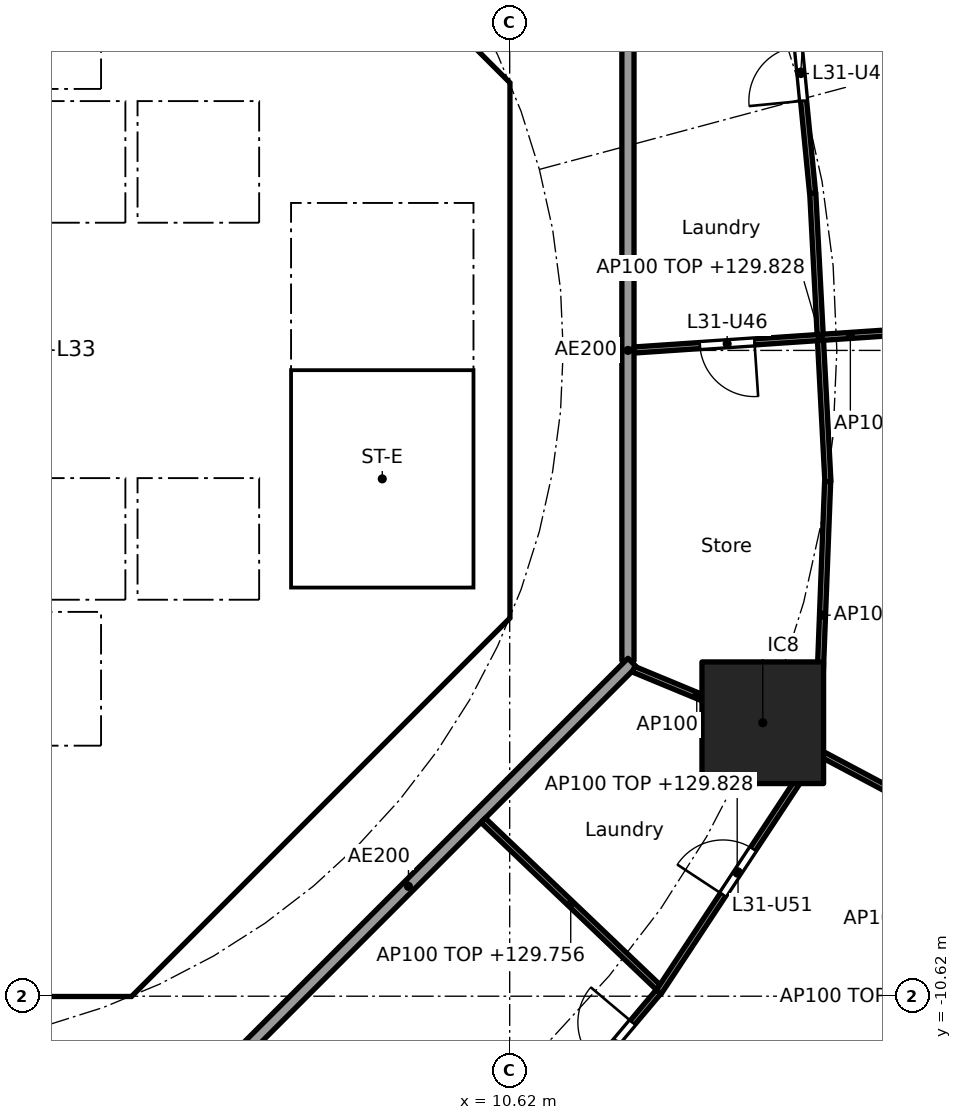
"""IFC4 building model, lengths in metres.
Left out: names, types, materials, properties, quantities, classifications, styles, units other than length and angle.
Written with IfcOpenShell. Run it as: python <this file> out.ifc"""

import sys

from ifc_helpers import new_model, si_unit, direction, frame, frame_2d, origin, origin_2d, place, context, subcontext, project, spatial, polyline, rectangle, outline, extrude, element, fill, save


model = new_model("IFC4")
c1 = context("Model", 3, precision=1e-05, world=origin(), true_north=direction((0.0, 1.0)))
c2 = subcontext(c1, "Body", "Model", "MODEL_VIEW")
j1 = project(units=[si_unit("LENGTHUNIT", "METRE"), si_unit("PLANEANGLEUNIT", "RADIAN")], contexts=[c1])
p1 = place(None, origin())
s1 = spatial("IfcSite", under=j1, at=p1, CompositionType="ELEMENT")
p2 = place(p1, origin())
s2 = spatial("IfcBuilding", under=s1, at=p2, CompositionType="ELEMENT")
p3 = place(p2, frame((0.0, 0.0, 127.0)))
s3 = spatial("IfcBuildingStorey", under=s2, at=p3, CompositionType="ELEMENT", Elevation=127.0)
p4 = place(p3, frame((14.782, -6.123, 0.0), z_axis=(0.0, 0.0, 1.0), x_axis=(1.0, 0.0, 0.0)))
e1 = element("IfcColumn", 1, at=p4, inside=s3, PredefinedType="COLUMN", context=c2, shape_type="SweptSolid", body=[
    extrude(rectangle(XDim=2.0, YDim=2.0, at=origin_2d()), origin(), (0.0, 0.0, 1.0), 3.7),
])
p5 = place(p3, frame((9.988, 4.613, 0.0), z_axis=(0.0, 0.0, 1.0), x_axis=(-0.707106781187, 0.707106781187, 0.0)))
e2 = element("IfcWall", 2, at=p5, inside=s3, PredefinedType="SHEAR", context=c2, shape_type="SweptSolid", body=[
    extrude(rectangle(XDim=7.602, YDim=0.6, at=frame_2d((3.801, 0.0))), origin(), (0.0, 0.0, 1.0), 3.44),
])
p6 = place(p5, frame((3.201, 0.0, 0.0)))
e3 = element("IfcOpeningElement", 3, at=p6, cuts=e2, PredefinedType="OPENING", context=c2, shape_type="SweptSolid", body=[
    extrude(rectangle(XDim=1.2, YDim=2.1, at=frame_2d((0.6, 1.05))), frame((0.0, 0.31, 0.0), z_axis=(0.0, -1.0, 0.0), x_axis=(1.0, 0.0, 0.0)), (0.0, 0.0, 1.0), 0.62),
])
p7 = place(p3, frame((4.613, -9.988, 0.0), z_axis=(0.0, 0.0, 1.0), x_axis=(0.707106781187, 0.707106781187, 0.0)))
e4 = element("IfcWall", 4, at=p7, inside=s3, PredefinedType="SHEAR", context=c2, shape_type="SweptSolid", body=[
    extrude(rectangle(XDim=7.602, YDim=0.6, at=frame_2d((3.801, 0.0))), origin(), (0.0, 0.0, 1.0), 3.44),
])
p8 = place(p7, frame((3.201, 0.0, 0.0)))
e5 = element("IfcOpeningElement", 5, at=p8, cuts=e4, PredefinedType="OPENING", context=c2, shape_type="SweptSolid", body=[
    extrude(rectangle(XDim=1.2, YDim=2.1, at=frame_2d((0.6, 1.05))), frame((0.0, 0.31, 0.0), z_axis=(0.0, -1.0, 0.0), x_axis=(1.0, 0.0, 0.0)), (0.0, 0.0, 1.0), 0.62),
])
p9 = place(p3, frame((4.0, 4.3, 0.0), z_axis=(0.0, 0.0, 1.0), x_axis=(0.0, 1.0, 0.0)))
e6 = element("IfcWall", 6, at=p9, inside=s3, PredefinedType="SOLIDWALL", context=c2, shape_type="SweptSolid", body=[
    extrude(rectangle(XDim=2.2, YDim=0.2, at=frame_2d((1.1, 0.0))), origin(), (0.0, 0.0, 1.0), 3.44),
])
p10 = place(p9, frame((0.55, 0.0, 0.0)))
e7 = element("IfcOpeningElement", 7, at=p10, cuts=e6, PredefinedType="OPENING", context=c2, shape_type="SweptSolid", body=[
    extrude(rectangle(XDim=1.1, YDim=2.1, at=frame_2d((0.55, 1.05))), frame((0.0, 0.11, 0.0), z_axis=(0.0, -1.0, 0.0), x_axis=(1.0, 0.0, 0.0)), (0.0, 0.0, 1.0), 0.22),
])
p11 = place(p3, frame((-6.7, 2.0, 0.0), z_axis=(0.0, 0.0, 1.0), x_axis=(1.0, 0.0, 0.0)))
e8 = element("IfcWall", 8, at=p11, inside=s3, PredefinedType="SOLIDWALL", context=c2, shape_type="SweptSolid", body=[
    extrude(rectangle(XDim=13.4, YDim=0.2, at=frame_2d((6.7, 0.0))), origin(), (0.0, 0.0, 1.0), 3.44),
])
p12 = place(p11, frame((0.65, 0.0, 0.0)))
e9 = element("IfcOpeningElement", 9, at=p12, cuts=e8, PredefinedType="OPENING", context=c2, shape_type="SweptSolid", body=[
    extrude(rectangle(XDim=1.1, YDim=2.1, at=frame_2d((0.55, 1.05))), frame((0.0, 0.11, 0.0), z_axis=(0.0, -1.0, 0.0), x_axis=(1.0, 0.0, 0.0)), (0.0, 0.0, 1.0), 0.22),
])
p13 = place(p11, frame((2.85, 0.0, 0.0)))
e10 = element("IfcOpeningElement", 10, at=p13, cuts=e8, PredefinedType="OPENING", context=c2, shape_type="SweptSolid", body=[
    extrude(rectangle(XDim=1.1, YDim=2.1, at=frame_2d((0.55, 1.05))), frame((0.0, 0.11, 0.0), z_axis=(0.0, -1.0, 0.0), x_axis=(1.0, 0.0, 0.0)), (0.0, 0.0, 1.0), 0.22),
])
p14 = place(p11, frame((5.05, 0.0, 0.0)))
e11 = element("IfcOpeningElement", 11, at=p14, cuts=e8, PredefinedType="OPENING", context=c2, shape_type="SweptSolid", body=[
    extrude(rectangle(XDim=1.1, YDim=2.1, at=frame_2d((0.55, 1.05))), frame((0.0, 0.11, 0.0), z_axis=(0.0, -1.0, 0.0), x_axis=(1.0, 0.0, 0.0)), (0.0, 0.0, 1.0), 0.22),
])
p15 = place(p3, frame((6.7, 4.0, 0.0), z_axis=(0.0, 0.0, 1.0), x_axis=(1.0, 0.0, 0.0)))
e12 = element("IfcWall", 12, at=p15, inside=s3, PredefinedType="SOLIDWALL", context=c2, shape_type="SweptSolid", body=[
    extrude(rectangle(XDim=3.325, YDim=0.2, at=frame_2d((1.662, 0.0))), origin(), (0.0, 0.0, 1.0), 3.44),
])
p16 = place(p15, frame((1.25, 0.0, 0.0)))
e13 = element("IfcOpeningElement", 13, at=p16, cuts=e12, PredefinedType="OPENING", context=c2, shape_type="SweptSolid", body=[
    extrude(rectangle(XDim=1.1, YDim=2.1, at=frame_2d((0.55, 1.05))), frame((0.0, 0.11, 0.0), z_axis=(0.0, -1.0, 0.0), x_axis=(1.0, 0.0, 0.0)), (0.0, 0.0, 1.0), 0.22),
])
p17 = place(p3, frame((4.0, -10.025, 0.0), z_axis=(0.0, 0.0, 1.0), x_axis=(0.0, 1.0, 0.0)))
e14 = element("IfcWall", 14, at=p17, inside=s3, PredefinedType="SOLIDWALL", context=c2, shape_type="SweptSolid", body=[
    extrude(rectangle(XDim=3.0, YDim=0.2, at=frame_2d((1.5, 0.0))), origin(), (0.0, 0.0, 1.0), 3.44),
])
p18 = place(p17, frame((0.975, 0.0, 0.0)))
e15 = element("IfcOpeningElement", 15, at=p18, cuts=e14, PredefinedType="OPENING", context=c2, shape_type="SweptSolid", body=[
    extrude(rectangle(XDim=1.1, YDim=2.1, at=frame_2d((0.55, 1.05))), frame((0.0, 0.11, 0.0), z_axis=(0.0, -1.0, 0.0), x_axis=(1.0, 0.0, 0.0)), (0.0, 0.0, 1.0), 0.22),
])
p19 = place(p3, frame((4.0, -6.5, 0.0), z_axis=(0.0, 0.0, 1.0), x_axis=(0.0, 1.0, 0.0)))
e16 = element("IfcWall", 16, at=p19, inside=s3, PredefinedType="SOLIDWALL", context=c2, shape_type="SweptSolid", body=[
    extrude(rectangle(XDim=2.2, YDim=0.2, at=frame_2d((1.1, 0.0))), origin(), (0.0, 0.0, 1.0), 3.44),
])
p20 = place(p19, frame((0.55, 0.0, 0.0)))
e17 = element("IfcOpeningElement", 17, at=p20, cuts=e16, PredefinedType="OPENING", context=c2, shape_type="SweptSolid", body=[
    extrude(rectangle(XDim=1.1, YDim=2.1, at=frame_2d((0.55, 1.05))), frame((0.0, 0.11, 0.0), z_axis=(0.0, -1.0, 0.0), x_axis=(1.0, 0.0, 0.0)), (0.0, 0.0, 1.0), 0.22),
])
p21 = place(p3, frame((-6.7, -2.0, 0.0), z_axis=(0.0, 0.0, 1.0), x_axis=(1.0, 0.0, 0.0)))
e18 = element("IfcWall", 18, at=p21, inside=s3, PredefinedType="SOLIDWALL", context=c2, shape_type="SweptSolid", body=[
    extrude(rectangle(XDim=13.4, YDim=0.2, at=frame_2d((6.7, 0.0))), origin(), (0.0, 0.0, 1.0), 3.44),
])
p22 = place(p21, frame((0.65, 0.0, 0.0)))
e19 = element("IfcOpeningElement", 19, at=p22, cuts=e18, PredefinedType="OPENING", context=c2, shape_type="SweptSolid", body=[
    extrude(rectangle(XDim=1.1, YDim=2.1, at=frame_2d((0.55, 1.05))), frame((0.0, 0.11, 0.0), z_axis=(0.0, -1.0, 0.0), x_axis=(1.0, 0.0, 0.0)), (0.0, 0.0, 1.0), 0.22),
])
p23 = place(p21, frame((2.85, 0.0, 0.0)))
e20 = element("IfcOpeningElement", 20, at=p23, cuts=e18, PredefinedType="OPENING", context=c2, shape_type="SweptSolid", body=[
    extrude(rectangle(XDim=1.1, YDim=2.1, at=frame_2d((0.55, 1.05))), frame((0.0, 0.11, 0.0), z_axis=(0.0, -1.0, 0.0), x_axis=(1.0, 0.0, 0.0)), (0.0, 0.0, 1.0), 0.22),
])
p24 = place(p3, origin())
e21 = element("IfcWall", 21, at=p24, inside=s3, PredefinedType="SHEAR", context=c2, shape_type="SweptSolid", body=[
    extrude(outline(polyline([(-4.152, -10.025), (4.152, -10.025), (4.401, -9.776), (4.825, -10.2), (4.401, -10.625), (-4.401, -10.625), (-4.825, -10.2), (-4.401, -9.776), (-4.152, -10.025)])), origin(), (0.0, 0.0, 1.0), 3.44),
])
p25 = place(p3, origin())
e22 = element("IfcWall", 22, at=p25, inside=s3, PredefinedType="SHEAR", context=c2, shape_type="SweptSolid", body=[
    extrude(outline(polyline([(9.776, -4.401), (10.025, -4.152), (10.025, -3.801), (10.025, 4.152), (9.776, 4.401), (10.2, 4.825), (10.625, 4.401), (10.625, -4.401), (10.2, -4.825), (9.776, -4.401)])), origin(), (0.0, 0.0, 1.0), 3.44),
])
p26 = place(p3, origin())
e23 = element("IfcWall", 23, at=p26, inside=s3, PredefinedType="SOLIDWALL", context=c2, shape_type="SweptSolid", body=[
    extrude(outline(polyline([(-6.7, -2.1), (-6.5, -2.1), (-6.5, -4.1), (-4.5, -4.1), (-4.5, -2.1), (-4.3, -2.1), (-4.3, -4.1), (-2.3, -4.1), (-2.3, -2.1), (-2.1, -2.1), (-2.1, -4.1), (-0.1, -4.1), (-0.1, -2.1), (0.1, -2.1), (0.1, -4.1), (2.1, -4.1), (2.1, -2.1), (2.3, -2.1), (2.3, -4.1), (4.3, -4.1), (4.3, -2.1), (4.5, -2.1), (4.5, -4.1), (6.5, -4.1), (6.5, -2.1), (6.7, -2.1), (6.7, -4.3), (-6.7, -4.3), (-6.7, -2.1)])), origin(), (0.0, 0.0, 1.0), 3.44),
])
p27 = place(p3, origin())
e24 = element("IfcWall", 24, at=p27, inside=s3, PredefinedType="SOLIDWALL", context=c2, shape_type="SweptSolid", body=[
    extrude(outline(polyline([(-6.5, 2.1), (-6.7, 2.1), (-6.7, 4.3), (6.7, 4.3), (6.7, 2.1), (6.5, 2.1), (6.5, 4.1), (4.5, 4.1), (4.5, 2.1), (4.3, 2.1), (4.3, 4.1), (2.3, 4.1), (2.3, 2.1), (2.1, 2.1), (2.1, 4.1), (0.1, 4.1), (0.1, 2.1), (-0.1, 2.1), (-0.1, 4.1), (-2.1, 4.1), (-2.1, 2.1), (-2.3, 2.1), (-2.3, 4.1), (-4.3, 4.1), (-4.3, 2.1), (-4.5, 2.1), (-4.5, 4.1), (-6.5, 4.1), (-6.5, 2.1)])), origin(), (0.0, 0.0, 1.0), 3.44),
])
p28 = place(p3, origin())
e25 = element("IfcWall", 25, at=p28, inside=s3, PredefinedType="SOLIDWALL", context=c2, shape_type="SweptSolid", body=[
    extrude(outline(polyline([(4.1, -7.025), (-4.1, -7.025), (-4.1, -6.5), (4.1, -6.5), (4.1, -7.025)])), origin(), (0.0, 0.0, 1.0), 3.44),
])
p29 = place(p3, origin())
e26 = element("IfcWall", 26, at=p29, inside=s3, PredefinedType="SOLIDWALL", context=c2, shape_type="SweptSolid", body=[
    extrude(outline(polyline([(7.025, -3.9), (6.7, -3.9), (6.7, 3.9), (7.025, 3.9), (7.025, -3.9)])), origin(), (0.0, 0.0, 1.0), 3.44),
])
p30 = place(p3, origin())
e27 = element("IfcWall", 27, at=p30, inside=s3, PredefinedType="SOLIDWALL", context=c2, shape_type="SweptSolid", body=[
    extrude(outline(polyline([(10.025, -4.1), (6.7, -4.1), (6.7, -3.9), (10.025, -3.9), (10.025, -4.1)])), origin(), (0.0, 0.0, 1.0), 3.44),
])
p31 = place(p3, frame((12.565, -5.104, 0.0), z_axis=(0.0, 0.0, 1.0), x_axis=(0.0, 1.0, 0.0)))
e28 = element("IfcWall", 28, at=p31, inside=s3, PredefinedType="PARTITIONING", context=c2, shape_type="SweptSolid", body=[
    extrude(rectangle(XDim=10.209, YDim=0.2, at=frame_2d((5.104, 0.0))), origin(), (0.0, 0.0, 1.0), 3.44),
])
p32 = place(p3, frame((5.275, -12.494, 0.0), z_axis=(0.0, 0.0, 1.0), x_axis=(0.707106781187, 0.707106781187, 0.0)))
e29 = element("IfcWall", 29, at=p32, inside=s3, PredefinedType="PARTITIONING", context=c2, shape_type="SweptSolid", body=[
    extrude(rectangle(XDim=10.409, YDim=0.2, at=frame_2d((5.205, 0.0))), origin(), (0.0, 0.0, 1.0), 3.44),
])
p33 = place(p3, frame((15.853, -2.158, 0.0), z_axis=(0.0, 0.0, 1.0), x_axis=(-0.052483289253, 0.99862180246, 0.0)))
e30 = element("IfcWall", 30, at=p33, inside=s3, PredefinedType="PARTITIONING", context=c2, shape_type="SweptSolid", body=[
    extrude(rectangle(XDim=4.75, YDim=0.1, at=frame_2d((2.375, 0.0))), origin(), (0.0, 0.0, 1.0), 2.828),
])
p34 = place(p3, frame((15.849, -2.158, 0.0), z_axis=(0.0, 0.0, 1.0), x_axis=(-0.038390448414, -0.999262815014, 0.0)))
e31 = element("IfcWall", 31, at=p34, inside=s3, PredefinedType="PARTITIONING", context=c2, shape_type="SweptSolid", body=[
    extrude(rectangle(XDim=4.394, YDim=0.1, at=frame_2d((2.197, 0.0))), origin(), (0.0, 0.0, 1.0), 3.44),
])
p35 = place(p3, frame((12.665, 0.007, 0.0), z_axis=(0.0, 0.0, 1.0), x_axis=(0.997737186236, 0.067234717233, 0.0)))
e32 = element("IfcWall", 32, at=p35, inside=s3, PredefinedType="PARTITIONING", context=c2, shape_type="SweptSolid", body=[
    extrude(rectangle(XDim=7.132, YDim=0.1, at=frame_2d((3.566, 0.0))), origin(), (0.0, 0.0, 1.0), 2.756),
])
p36 = place(p35, frame((4.651, 0.0, 0.0)))
e33 = element("IfcOpeningElement", 33, at=p36, cuts=e32, PredefinedType="OPENING", context=c2, shape_type="SweptSolid", body=[
    extrude(rectangle(XDim=0.9, YDim=2.1, at=frame_2d((0.45, 1.05))), frame((0.0, 0.06, 0.0), z_axis=(0.0, -1.0, 0.0), x_axis=(1.0, 0.0, 0.0)), (0.0, 0.0, 1.0), 0.12),
])
p37 = place(p35, frame((1.085, 0.0, 0.0)))
e34 = element("IfcOpeningElement", 34, at=p37, cuts=e32, PredefinedType="OPENING", context=c2, shape_type="SweptSolid", body=[
    extrude(rectangle(XDim=0.9, YDim=2.1, at=frame_2d((0.45, 1.05))), frame((0.0, 0.06, 0.0), z_axis=(0.0, -1.0, 0.0), x_axis=(1.0, 0.0, 0.0)), (0.0, 0.0, 1.0), 0.12),
])
p38 = place(p3, frame((15.602, 2.584, 0.0), z_axis=(0.0, 0.0, 1.0), x_axis=(-0.097216297846, 0.995263277446, 0.0)))
e35 = element("IfcWall", 35, at=p38, inside=s3, PredefinedType="PARTITIONING", context=c2, shape_type="SweptSolid", body=[
    extrude(rectangle(XDim=4.006, YDim=0.1, at=frame_2d((2.003, 0.0))), origin(), (0.0, 0.0, 1.0), 2.828),
])
p39 = place(p38, frame((1.528, 0.0, 0.0)))
e36 = element("IfcOpeningElement", 36, at=p39, cuts=e35, PredefinedType="OPENING", context=c2, shape_type="SweptSolid", body=[
    extrude(rectangle(XDim=0.9, YDim=2.1, at=frame_2d((0.45, 1.05))), frame((0.0, 0.06, 0.0), z_axis=(0.0, -1.0, 0.0), x_axis=(1.0, 0.0, 0.0)), (0.0, 0.0, 1.0), 0.12),
])
p40 = place(p3, frame((10.138, -14.026, 0.0), z_axis=(0.0, 0.0, 1.0), x_axis=(0.644051444483, 0.764982180746, 0.0)))
e37 = element("IfcWall", 37, at=p40, inside=s3, PredefinedType="PARTITIONING", context=c2, shape_type="SweptSolid", body=[
    extrude(rectangle(XDim=4.548, YDim=0.1, at=frame_2d((2.274, 0.0))), origin(), (0.0, 0.0, 1.0), 2.828),
])
p41 = place(p40, frame((2.986, 0.0, 0.0)))
e38 = element("IfcOpeningElement", 38, at=p41, cuts=e37, PredefinedType="OPENING", context=c2, shape_type="SweptSolid", body=[
    extrude(rectangle(XDim=0.9, YDim=2.1, at=frame_2d((0.45, 1.05))), frame((0.0, 0.06, 0.0), z_axis=(0.0, -1.0, 0.0), x_axis=(1.0, 0.0, 0.0)), (0.0, 0.0, 1.0), 0.12),
])
p42 = place(p3, frame((10.184, -7.727, 0.0), z_axis=(0.0, 0.0, 1.0), x_axis=(0.723654892782, -0.690162007179, 0.0)))
e39 = element("IfcWall", 39, at=p42, inside=s3, PredefinedType="PARTITIONING", context=c2, shape_type="SweptSolid", body=[
    extrude(rectangle(XDim=3.98, YDim=0.1, at=frame_2d((1.99, 0.0))), origin(), (0.0, 0.0, 1.0), 2.756),
])
p43 = place(p3, frame((13.072, -10.55, 0.0), z_axis=(0.0, 0.0, 1.0), x_axis=(0.550614843759, 0.834759422727, 0.0)))
e40 = element("IfcWall", 40, at=p43, inside=s3, PredefinedType="PARTITIONING", context=c2, shape_type="SweptSolid", body=[
    extrude(rectangle(XDim=4.683, YDim=0.1, at=frame_2d((2.341, 0.0))), origin(), (0.0, 0.0, 1.0), 2.828),
])
p44 = place(p43, frame((1.917, 0.0, 0.0)))
e41 = element("IfcOpeningElement", 41, at=p44, cuts=e40, PredefinedType="OPENING", context=c2, shape_type="SweptSolid", body=[
    extrude(rectangle(XDim=0.9, YDim=2.1, at=frame_2d((0.45, 1.05))), frame((0.0, 0.06, 0.0), z_axis=(0.0, -1.0, 0.0), x_axis=(1.0, 0.0, 0.0)), (0.0, 0.0, 1.0), 0.12),
])
p45 = place(p3, frame((12.657, -5.243, 0.0), z_axis=(0.0, 0.0, 1.0), x_axis=(0.923864733477, -0.382719158442, 0.0)))
e42 = element("IfcWall", 42, at=p45, inside=s3, PredefinedType="PARTITIONING", context=c2, shape_type="SweptSolid", body=[
    extrude(rectangle(XDim=2.25, YDim=0.1, at=frame_2d((1.125, 0.0))), origin(), (0.0, 0.0, 1.0), 3.44),
])
p46 = place(p3, frame((14.826, -6.146, 0.0), z_axis=(0.0, 0.0, 1.0), x_axis=(0.883012998471, -0.469348532044, 0.0)))
e43 = element("IfcWall", 43, at=p46, inside=s3, PredefinedType="PARTITIONING", context=c2, shape_type="SweptSolid", body=[
    extrude(rectangle(XDim=9.172, YDim=0.1, at=frame_2d((4.586, 0.0))), origin(), (0.0, 0.0, 1.0), 2.828),
])
p47 = place(p46, frame((2.728, 0.0, 0.0)))
e44 = element("IfcOpeningElement", 44, at=p47, cuts=e43, PredefinedType="OPENING", context=c2, shape_type="SweptSolid", body=[
    extrude(rectangle(XDim=0.9, YDim=2.1, at=frame_2d((0.45, 1.05))), frame((0.0, 0.06, 0.0), z_axis=(0.0, -1.0, 0.0), x_axis=(1.0, 0.0, 0.0)), (0.0, 0.0, 1.0), 0.12),
])
p48 = place(p10, origin())
e45 = element("IfcDoor", 45, at=p48, inside=s3, OperationType="DOUBLE_DOOR_SLIDING", PredefinedType="DOOR", context=c2, shape_type="SweptSolid", body=[
    extrude(rectangle(XDim=1.1, YDim=2.1, at=frame_2d((0.55, 1.05))), frame((0.0, 0.025, 0.0), z_axis=(0.0, -1.0, 0.0), x_axis=(1.0, 0.0, 0.0)), (0.0, 0.0, 1.0), 0.05),
])
fill(e7, e45)
p49 = place(p20, origin())
e46 = element("IfcDoor", 46, at=p49, inside=s3, OperationType="DOUBLE_DOOR_SLIDING", PredefinedType="DOOR", context=c2, shape_type="SweptSolid", body=[
    extrude(rectangle(XDim=1.1, YDim=2.1, at=frame_2d((0.55, 1.05))), frame((0.0, 0.025, 0.0), z_axis=(0.0, -1.0, 0.0), x_axis=(1.0, 0.0, 0.0)), (0.0, 0.0, 1.0), 0.05),
])
fill(e17, e46)
p50 = place(p16, frame((1.1, 0.0, 0.0), x_axis=(-1.0, 0.0, 0.0)))
e47 = element("IfcDoor", 47, at=p50, inside=s3, OperationType="SINGLE_SWING_RIGHT", PredefinedType="DOOR", context=c2, shape_type="SweptSolid", body=[
    extrude(rectangle(XDim=1.1, YDim=2.1, at=frame_2d((0.55, 1.05))), frame((0.0, 0.025, 0.0), z_axis=(0.0, -1.0, 0.0), x_axis=(1.0, 0.0, 0.0)), (0.0, 0.0, 1.0), 0.05),
])
fill(e13, e47)
p51 = place(p18, origin())
e48 = element("IfcDoor", 48, at=p51, inside=s3, OperationType="SINGLE_SWING_RIGHT", PredefinedType="DOOR", context=c2, shape_type="SweptSolid", body=[
    extrude(rectangle(XDim=1.1, YDim=2.1, at=frame_2d((0.55, 1.05))), frame((0.0, 0.025, 0.0), z_axis=(0.0, -1.0, 0.0), x_axis=(1.0, 0.0, 0.0)), (0.0, 0.0, 1.0), 0.05),
])
fill(e15, e48)
p52 = place(p8, origin())
e49 = element("IfcDoor", 49, at=p52, inside=s3, OperationType="SINGLE_SWING_RIGHT", PredefinedType="DOOR", context=c2, shape_type="SweptSolid", body=[
    extrude(rectangle(XDim=1.2, YDim=2.1, at=frame_2d((0.6, 1.05))), frame((0.0, 0.025, 0.0), z_axis=(0.0, -1.0, 0.0), x_axis=(1.0, 0.0, 0.0)), (0.0, 0.0, 1.0), 0.05),
])
fill(e5, e49)
p53 = place(p39, origin())
e50 = element("IfcDoor", 50, at=p53, inside=s3, OperationType="SINGLE_SWING_LEFT", PredefinedType="DOOR", context=c2, shape_type="SweptSolid", body=[
    extrude(rectangle(XDim=0.9, YDim=2.1, at=frame_2d((0.45, 1.05))), frame((0.0, 0.025, 0.0), z_axis=(0.0, -1.0, 0.0), x_axis=(1.0, 0.0, 0.0)), (0.0, 0.0, 1.0), 0.05),
])
fill(e36, e50)
p54 = place(p37, frame((0.9, 0.0, 0.0), x_axis=(-1.0, 0.0, 0.0)))
e51 = element("IfcDoor", 51, at=p54, inside=s3, OperationType="SINGLE_SWING_LEFT", PredefinedType="DOOR", context=c2, shape_type="SweptSolid", body=[
    extrude(rectangle(XDim=0.9, YDim=2.1, at=frame_2d((0.45, 1.05))), frame((0.0, 0.025, 0.0), z_axis=(0.0, -1.0, 0.0), x_axis=(1.0, 0.0, 0.0)), (0.0, 0.0, 1.0), 0.05),
])
fill(e34, e51)
p55 = place(p41, origin())
e52 = element("IfcDoor", 52, at=p55, inside=s3, OperationType="SINGLE_SWING_RIGHT", PredefinedType="DOOR", context=c2, shape_type="SweptSolid", body=[
    extrude(rectangle(XDim=0.9, YDim=2.1, at=frame_2d((0.45, 1.05))), frame((0.0, 0.025, 0.0), z_axis=(0.0, -1.0, 0.0), x_axis=(1.0, 0.0, 0.0)), (0.0, 0.0, 1.0), 0.05),
])
fill(e38, e52)
p56 = place(p44, origin())
e53 = element("IfcDoor", 53, at=p56, inside=s3, OperationType="SINGLE_SWING_LEFT", PredefinedType="DOOR", context=c2, shape_type="SweptSolid", body=[
    extrude(rectangle(XDim=0.9, YDim=2.1, at=frame_2d((0.45, 1.05))), frame((0.0, 0.025, 0.0), z_axis=(0.0, -1.0, 0.0), x_axis=(1.0, 0.0, 0.0)), (0.0, 0.0, 1.0), 0.05),
])
fill(e41, e53)
save(model, sys.argv[1])
